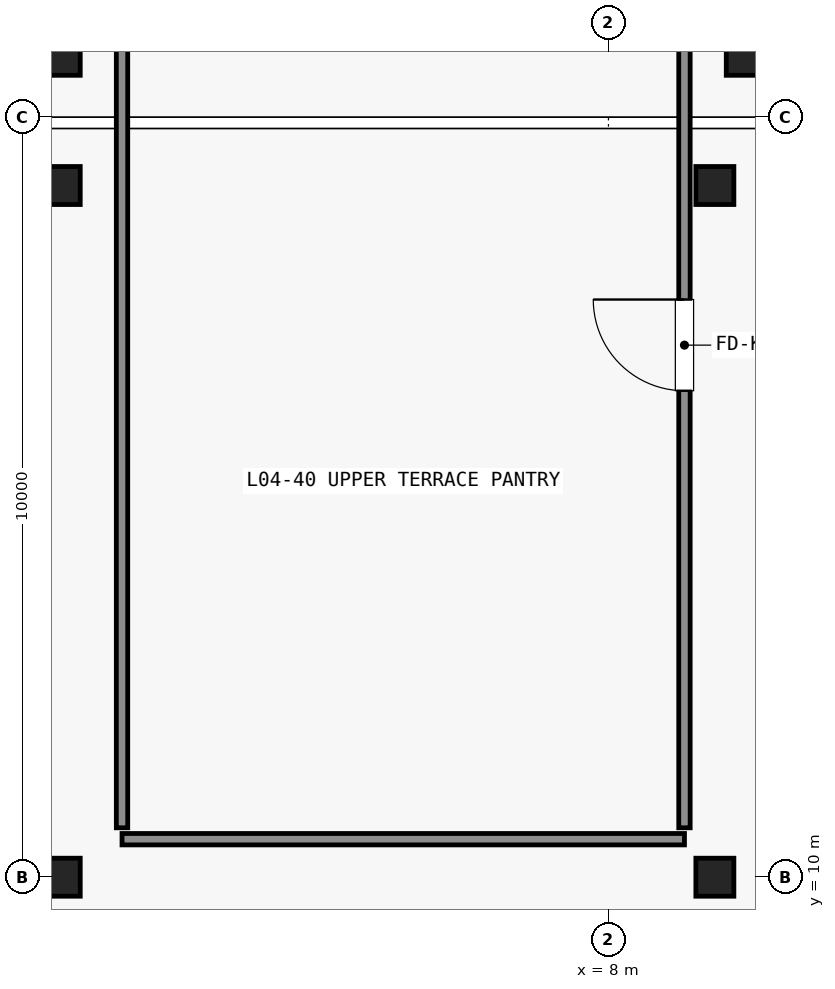
"""IFC4 building model, lengths in metres.
Left out: names, types, materials, properties, quantities, classifications, styles, units other than length and angle.
Written with IfcOpenShell. Run it as: python <this file> out.ifc"""

import sys

from ifc_helpers import new_model, si_unit, direction, frame, frame_2d, origin, origin_2d, place, context, subcontext, project, spatial, rectangle, extrude, element, fill, save


model = new_model("IFC4")
c1 = context("Model", 3, precision=1e-05, world=origin(), true_north=direction((0.0, 1.0)))
c2 = subcontext(c1, "Body", "Model", "MODEL_VIEW")
j1 = project(units=[si_unit("LENGTHUNIT", "METRE"), si_unit("PLANEANGLEUNIT", "RADIAN")], contexts=[c1])
p1 = place(None, origin())
s1 = spatial("IfcSite", under=j1, at=p1, CompositionType="ELEMENT")
p2 = place(p1, origin())
s2 = spatial("IfcBuilding", under=s1, at=p2, CompositionType="ELEMENT")
p3 = place(p2, frame((0.0, 0.0, 21.0)))
s3 = spatial("IfcBuildingStorey", under=s2, at=p3, CompositionType="ELEMENT", Elevation=21.0)
for number, where, z_axis, x_axis in (
    (1, (0.8, 10.0, 0.0), (0.0, 0.0, 1.0), (1.0, 0.0, 0.0)),
    (2, (0.8, 19.1, 0.0), (0.0, 0.0, 1.0), (1.0, 0.0, 0.0)),
    (3, (9.4, 10.0, 0.0), (0.0, 0.0, 1.0), (1.0, 0.0, 0.0)),
    (4, (9.4, 19.1, 0.0), (0.0, 0.0, 1.0), (1.0, 0.0, 0.0)),
    (5, (0.8, 20.8, 0.0), (0.0, 0.0, 1.0), (1.0, 0.0, 0.0)),
    (6, (9.8, 20.8, 0.0), (0.0, 0.0, 1.0), (1.0, 0.0, 0.0)),
):
    element("IfcColumn", number, at=place(p3, frame(where, z_axis=z_axis, x_axis=x_axis)), inside=s3, PredefinedType="COLUMN", context=c2, shape_type="SweptSolid", body=[
        extrude(rectangle(XDim=0.5, YDim=0.5, at=origin_2d()), origin(), (0.0, 0.0, 1.0), 5.08),
    ])
p4 = place(p3, frame((1.6, 10.5, 0.0), z_axis=(0.0, 0.0, 1.0), x_axis=(1.0, 0.0, 0.0)))
e7 = element("IfcWall", 7, at=p4, inside=s3, PredefinedType="STANDARD", context=c2, shape_type="SweptSolid", body=[
    extrude(rectangle(XDim=7.4, YDim=0.15, at=frame_2d((3.7, 0.0))), origin(), (0.0, 0.0, 1.0), 4.33),
])
p5 = place(p3, frame((1.6, 10.65, 0.0), z_axis=(0.0, 0.0, 1.0), x_axis=(0.0, 1.0, 0.0)))
e8 = element("IfcWall", 8, at=p5, inside=s3, PredefinedType="STANDARD", context=c2, shape_type="SweptSolid", body=[
    extrude(rectangle(XDim=12.7, YDim=0.15, at=frame_2d((6.35, 0.0))), origin(), (0.0, 0.0, 1.0), 4.33),
])
p6 = place(p3, frame((9.0, 10.65, 0.0), z_axis=(0.0, 0.0, 1.0), x_axis=(0.0, 1.0, 0.0)))
e9 = element("IfcWall", 9, at=p6, inside=s3, PredefinedType="STANDARD", context=c2, shape_type="SweptSolid", body=[
    extrude(rectangle(XDim=12.7, YDim=0.15, at=frame_2d((6.35, 0.0))), origin(), (0.0, 0.0, 1.0), 4.33),
])
p7 = place(p6, frame((5.75, 0.0, 0.0)))
e10 = element("IfcOpeningElement", 10, at=p7, cuts=e9, PredefinedType="OPENING", context=c2, shape_type="SweptSolid", body=[
    extrude(rectangle(XDim=1.2, YDim=2.2, at=frame_2d((0.6, 1.1))), frame((0.0, 0.085, 0.0), z_axis=(0.0, -1.0, 0.0), x_axis=(1.0, 0.0, 0.0)), (0.0, 0.0, 1.0), 0.17),
])
p8 = place(p7, origin())
e11 = element("IfcDoor", 11, at=p8, inside=s3, OperationType="SINGLE_SWING_RIGHT", PredefinedType="DOOR", context=c2, shape_type="SweptSolid", body=[
    extrude(rectangle(XDim=1.2, YDim=2.2, at=frame_2d((0.6, 1.1))), frame((0.0, 0.025, 0.0), z_axis=(0.0, -1.0, 0.0), x_axis=(1.0, 0.0, 0.0)), (0.0, 0.0, 1.0), 0.05),
])
fill(e10, e11)
save(model, sys.argv[1])
